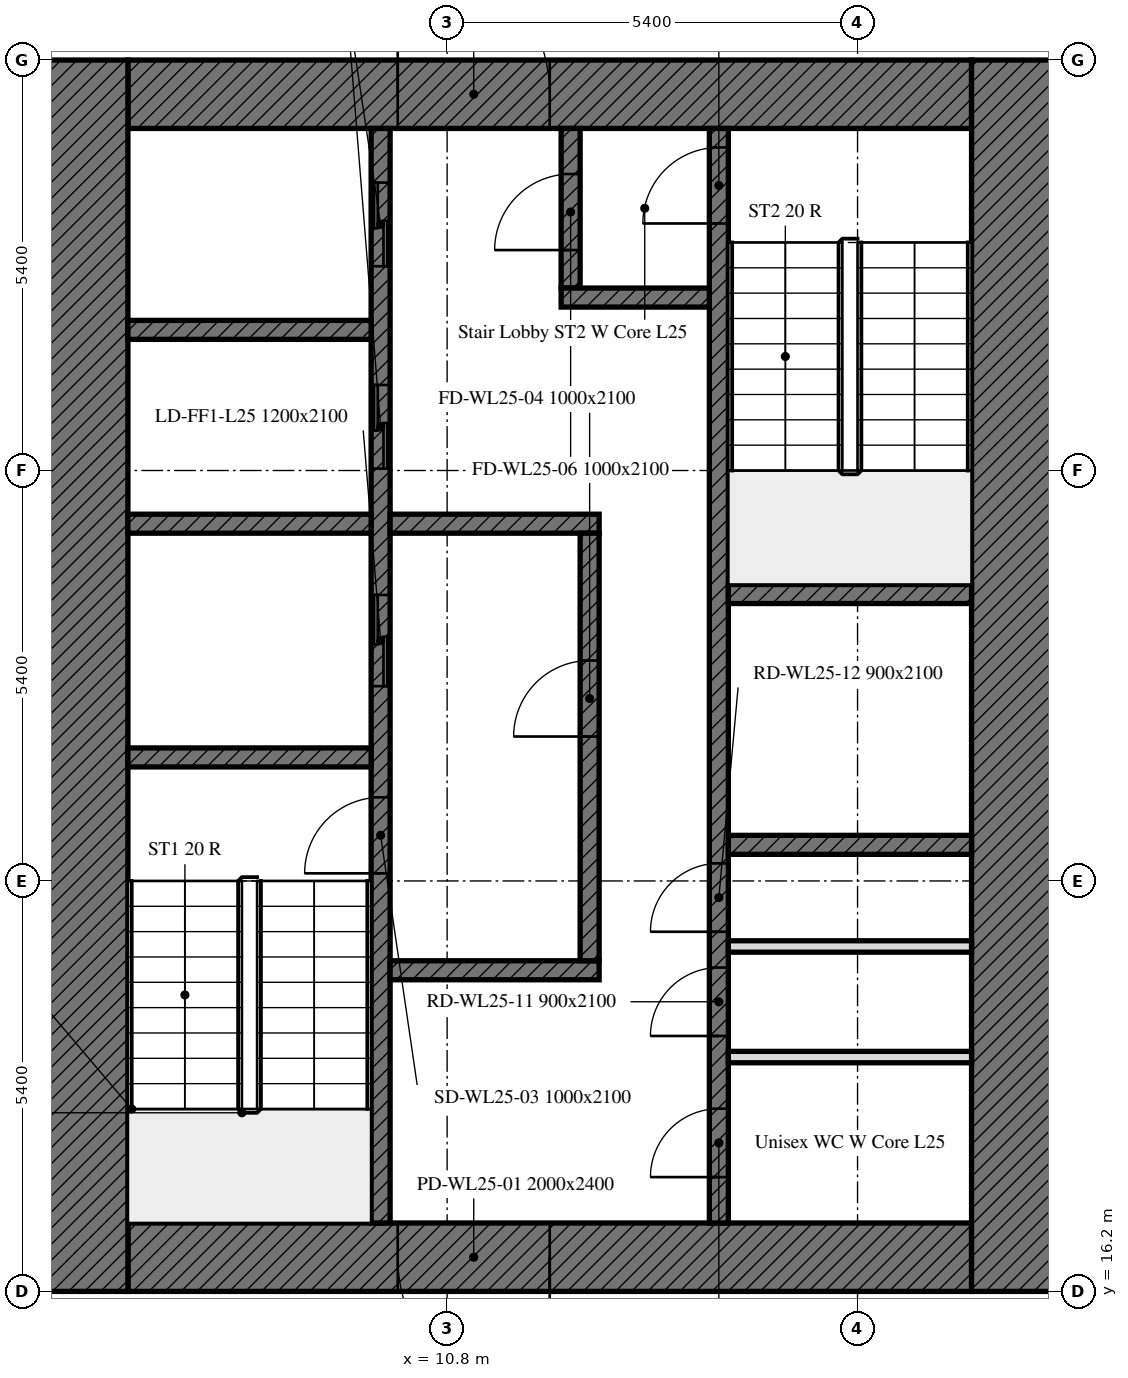
"""IFC4 building model, lengths in metres.
Left out: names, types, materials, properties, quantities, classifications, styles, units other than length and angle.
Written with IfcOpenShell. Run it as: python <this file> out.ifc"""

import sys

from ifc_helpers import new_model, si_unit, direction, frame, frame_2d, origin, place, context, subcontext, project, spatial, rectangle, extrude, element, fill, save


model = new_model("IFC4")
c1 = context("Model", 3, precision=1e-05, world=origin(), true_north=direction((0.0, 1.0)))
c2 = subcontext(c1, "Body", "Model", "MODEL_VIEW")
j1 = project(units=[si_unit("LENGTHUNIT", "METRE"), si_unit("PLANEANGLEUNIT", "RADIAN")], contexts=[c1])
p1 = place(None, origin())
s1 = spatial("IfcSite", under=j1, at=p1, CompositionType="ELEMENT")
p2 = place(p1, origin())
s2 = spatial("IfcBuilding", under=s1, at=p2, CompositionType="ELEMENT")
p3 = place(p2, frame((0.0, 0.0, 106.8)))
s3 = spatial("IfcBuildingStorey", under=s2, at=p3, CompositionType="ELEMENT", Elevation=106.8)
p4 = place(p3, frame((17.7, 16.65, 0.0), z_axis=(0.0, 0.0, 1.0), x_axis=(-1.0, 0.0, 0.0)))
e1 = element("IfcWall", 1, at=p4, inside=s3, PredefinedType="SOLIDWALL", context=c2, shape_type="SweptSolid", body=[
    extrude(rectangle(XDim=11.1, YDim=0.9, at=frame_2d((5.55, 0.0))), origin(), (0.0, 0.0, 1.0), 3.5),
])
p5 = place(p4, frame((5.55, 0.0, 0.0)))
e2 = element("IfcOpeningElement", 2, at=p5, cuts=e1, PredefinedType="OPENING", context=c2, shape_type="SweptSolid", body=[
    extrude(rectangle(XDim=2.0, YDim=2.4, at=frame_2d((1.0, 1.2))), frame((0.0, 0.45, 0.0), z_axis=(0.0, -1.0, 0.0), x_axis=(1.0, 0.0, 0.0)), (0.0, 0.0, 1.0), 0.9),
])
p6 = place(p3, frame((6.6, 31.95, 0.0), z_axis=(0.0, 0.0, 1.0), x_axis=(1.0, 0.0, 0.0)))
e3 = element("IfcWall", 3, at=p6, inside=s3, PredefinedType="SOLIDWALL", context=c2, shape_type="SweptSolid", body=[
    extrude(rectangle(XDim=11.1, YDim=0.9, at=frame_2d((5.55, 0.0))), origin(), (0.0, 0.0, 1.0), 3.5),
])
p7 = place(p6, frame((3.55, 0.0, 0.0)))
e4 = element("IfcOpeningElement", 4, at=p7, cuts=e3, PredefinedType="OPENING", context=c2, shape_type="SweptSolid", body=[
    extrude(rectangle(XDim=2.0, YDim=2.4, at=frame_2d((1.0, 1.2))), frame((0.0, 0.45, 0.0), z_axis=(0.0, -1.0, 0.0), x_axis=(1.0, 0.0, 0.0)), (0.0, 0.0, 1.0), 0.9),
])
for number, where, z_axis, x_axis in (
    (5, (6.0, 16.2, 0.0), (0.0, 0.0, 1.0), (0.0, 1.0, 0.0)),
    (6, (18.3, 32.4, 0.0), (0.0, 0.0, 1.0), (0.0, -1.0, 0.0)),
):
    element("IfcWall", number, at=place(p3, frame(where, z_axis=z_axis, x_axis=x_axis)), inside=s3, PredefinedType="SOLIDWALL", context=c2, shape_type="SweptSolid", body=[
        extrude(rectangle(XDim=16.2, YDim=1.2, at=frame_2d((8.1, 0.0))), origin(), (0.0, 0.0, 1.0), 3.5),
    ])
p8 = place(p3, frame((9.925, 17.1, 0.0), z_axis=(0.0, 0.0, 1.0), x_axis=(0.0, 1.0, 0.0)))
e7 = element("IfcWall", 7, at=p8, inside=s3, PredefinedType="SOLIDWALL", context=c2, shape_type="SweptSolid", body=[
    extrude(rectangle(XDim=14.4, YDim=0.25, at=frame_2d((7.2, 0.0))), origin(), (0.0, 0.0, 1.0), 3.5),
])
p9 = place(p8, frame((4.6, 0.0, 0.0)))
e8 = element("IfcOpeningElement", 8, at=p9, cuts=e7, PredefinedType="OPENING", context=c2, shape_type="SweptSolid", body=[
    extrude(rectangle(XDim=1.0, YDim=2.1, at=frame_2d((0.5, 1.05))), frame((0.0, 0.125, 0.0), z_axis=(0.0, -1.0, 0.0), x_axis=(1.0, 0.0, 0.0)), (0.0, 0.0, 1.0), 0.25),
])
p10 = place(p8, frame((7.062, 0.0, 0.0)))
e9 = element("IfcOpeningElement", 9, at=p10, cuts=e7, PredefinedType="OPENING", context=c2, shape_type="SweptSolid", body=[
    extrude(rectangle(XDim=1.2, YDim=2.1, at=frame_2d((0.6, 1.05))), frame((0.0, 0.125, 0.0), z_axis=(0.0, -1.0, 0.0), x_axis=(1.0, 0.0, 0.0)), (0.0, 0.0, 1.0), 0.25),
])
p11 = place(p8, frame((9.925, 0.0, 0.0)))
e10 = element("IfcOpeningElement", 10, at=p11, cuts=e7, PredefinedType="OPENING", context=c2, shape_type="SweptSolid", body=[
    extrude(rectangle(XDim=1.1, YDim=2.1, at=frame_2d((0.55, 1.05))), frame((0.0, 0.125, 0.0), z_axis=(0.0, -1.0, 0.0), x_axis=(1.0, 0.0, 0.0)), (0.0, 0.0, 1.0), 0.25),
])
p12 = place(p8, frame((12.587, 0.0, 0.0)))
e11 = element("IfcOpeningElement", 11, at=p12, cuts=e7, PredefinedType="OPENING", context=c2, shape_type="SweptSolid", body=[
    extrude(rectangle(XDim=1.1, YDim=2.1, at=frame_2d((0.55, 1.05))), frame((0.0, 0.125, 0.0), z_axis=(0.0, -1.0, 0.0), x_axis=(1.0, 0.0, 0.0)), (0.0, 0.0, 1.0), 0.25),
])
p13 = place(p3, frame((14.375, 17.1, 0.0), z_axis=(0.0, 0.0, 1.0), x_axis=(0.0, 1.0, 0.0)))
e12 = element("IfcWall", 12, at=p13, inside=s3, PredefinedType="SOLIDWALL", context=c2, shape_type="SweptSolid", body=[
    extrude(rectangle(XDim=14.4, YDim=0.25, at=frame_2d((7.2, 0.0))), origin(), (0.0, 0.0, 1.0), 3.5),
])
p14 = place(p13, frame((13.15, 0.0, 0.0)))
e13 = element("IfcOpeningElement", 13, at=p14, cuts=e12, PredefinedType="OPENING", context=c2, shape_type="SweptSolid", body=[
    extrude(rectangle(XDim=1.0, YDim=2.1, at=frame_2d((0.5, 1.05))), frame((0.0, 0.125, 0.0), z_axis=(0.0, -1.0, 0.0), x_axis=(1.0, 0.0, 0.0)), (0.0, 0.0, 1.0), 0.25),
])
p15 = place(p13, frame((0.604, 0.0, 0.0)))
e14 = element("IfcOpeningElement", 14, at=p15, cuts=e12, PredefinedType="OPENING", context=c2, shape_type="SweptSolid", body=[
    extrude(rectangle(XDim=0.9, YDim=2.1, at=frame_2d((0.45, 1.05))), frame((0.0, 0.125, 0.0), z_axis=(0.0, -1.0, 0.0), x_axis=(1.0, 0.0, 0.0)), (0.0, 0.0, 1.0), 0.25),
])
p16 = place(p13, frame((2.46, 0.0, 0.0)))
e15 = element("IfcOpeningElement", 15, at=p16, cuts=e12, PredefinedType="OPENING", context=c2, shape_type="SweptSolid", body=[
    extrude(rectangle(XDim=0.9, YDim=2.1, at=frame_2d((0.45, 1.05))), frame((0.0, 0.125, 0.0), z_axis=(0.0, -1.0, 0.0), x_axis=(1.0, 0.0, 0.0)), (0.0, 0.0, 1.0), 0.25),
])
p17 = place(p13, frame((3.832, 0.0, 0.0)))
e16 = element("IfcOpeningElement", 16, at=p17, cuts=e12, PredefinedType="OPENING", context=c2, shape_type="SweptSolid", body=[
    extrude(rectangle(XDim=0.9, YDim=2.1, at=frame_2d((0.45, 1.05))), frame((0.0, 0.125, 0.0), z_axis=(0.0, -1.0, 0.0), x_axis=(1.0, 0.0, 0.0)), (0.0, 0.0, 1.0), 0.25),
])
for number, where, z_axis, x_axis in (
    (17, (6.6, 23.225, 0.0), (0.0, 0.0, 1.0), (1.0, 0.0, 0.0)),
    (18, (14.5, 25.375, 0.0), (0.0, 0.0, 1.0), (1.0, 0.0, 0.0)),
    (19, (14.5, 22.075, 0.0), (0.0, 0.0, 1.0), (1.0, 0.0, 0.0)),
    (20, (6.6, 26.3, 0.0), (0.0, 0.0, 1.0), (1.0, 0.0, 0.0)),
):
    element("IfcWall", number, at=place(p3, frame(where, z_axis=z_axis, x_axis=x_axis)), inside=s3, PredefinedType="SOLIDWALL", context=c2, shape_type="SweptSolid", body=[
        extrude(rectangle(XDim=3.2, YDim=0.25, at=frame_2d((1.6, 0.0))), origin(), (0.0, 0.0, 1.0), 3.5),
    ])
for number, where, z_axis, x_axis in (
    (21, (10.05, 26.3, 0.0), (0.0, 0.0, 1.0), (1.0, 0.0, 0.0)),
    (22, (10.05, 20.425, 0.0), (0.0, 0.0, 1.0), (1.0, 0.0, 0.0)),
):
    element("IfcWall", number, at=place(p3, frame(where, z_axis=z_axis, x_axis=x_axis)), inside=s3, PredefinedType="SOLIDWALL", context=c2, shape_type="SweptSolid", body=[
        extrude(rectangle(XDim=2.75, YDim=0.25, at=frame_2d((1.375, 0.0))), origin(), (0.0, 0.0, 1.0), 3.5),
    ])
p18 = place(p3, frame((12.425, 29.4, 0.0), z_axis=(0.0, 0.0, 1.0), x_axis=(0.0, 1.0, 0.0)))
e23 = element("IfcWall", 23, at=p18, inside=s3, PredefinedType="SOLIDWALL", context=c2, shape_type="SweptSolid", body=[
    extrude(rectangle(XDim=2.1, YDim=0.25, at=frame_2d((1.05, 0.0))), origin(), (0.0, 0.0, 1.0), 3.5),
])
p19 = place(p18, frame((0.5, 0.0, 0.0)))
e24 = element("IfcOpeningElement", 24, at=p19, cuts=e23, PredefinedType="OPENING", context=c2, shape_type="SweptSolid", body=[
    extrude(rectangle(XDim=1.0, YDim=2.1, at=frame_2d((0.5, 1.05))), frame((0.0, 0.125, 0.0), z_axis=(0.0, -1.0, 0.0), x_axis=(1.0, 0.0, 0.0)), (0.0, 0.0, 1.0), 0.25),
])
p20 = place(p3, frame((12.3, 29.275, 0.0), z_axis=(0.0, 0.0, 1.0), x_axis=(1.0, 0.0, 0.0)))
e25 = element("IfcWall", 25, at=p20, inside=s3, PredefinedType="SOLIDWALL", context=c2, shape_type="SweptSolid", body=[
    extrude(rectangle(XDim=1.95, YDim=0.25, at=frame_2d((0.975, 0.0))), origin(), (0.0, 0.0, 1.0), 3.5),
])
p21 = place(p3, frame((12.675, 20.55, 0.0), z_axis=(0.0, 0.0, 1.0), x_axis=(0.0, 1.0, 0.0)))
e26 = element("IfcWall", 26, at=p21, inside=s3, PredefinedType="SOLIDWALL", context=c2, shape_type="SweptSolid", body=[
    extrude(rectangle(XDim=5.625, YDim=0.25, at=frame_2d((2.812, 0.0))), origin(), (0.0, 0.0, 1.0), 3.5),
])
p22 = place(p21, frame((2.95, 0.0, 0.0)))
e27 = element("IfcOpeningElement", 27, at=p22, cuts=e26, PredefinedType="OPENING", context=c2, shape_type="SweptSolid", body=[
    extrude(rectangle(XDim=1.0, YDim=2.1, at=frame_2d((0.5, 1.05))), frame((0.0, 0.125, 0.0), z_axis=(0.0, -1.0, 0.0), x_axis=(1.0, 0.0, 0.0)), (0.0, 0.0, 1.0), 0.25),
])
p23 = place(p3, frame((6.6, 28.85, 0.0), z_axis=(0.0, 0.0, 1.0), x_axis=(1.0, 0.0, 0.0)))
e28 = element("IfcWall", 28, at=p23, inside=s3, PredefinedType="SOLIDWALL", context=c2, shape_type="SweptSolid", body=[
    extrude(rectangle(XDim=3.2, YDim=0.25, at=frame_2d((1.6, 0.0))), origin(), (0.0, 0.0, 1.0), 3.5),
])
for number, where, z_axis, x_axis in (
    (29, (14.5, 19.283, 0.0), (0.0, 0.0, 1.0), (1.0, 0.0, 0.0)),
    (30, (14.5, 20.738, 0.0), (0.0, 0.0, 1.0), (1.0, 0.0, 0.0)),
):
    element("IfcWall", number, at=place(p3, frame(where, z_axis=z_axis, x_axis=x_axis)), inside=s3, PredefinedType="PARTITIONING", context=c2, shape_type="SweptSolid", body=[
        extrude(rectangle(XDim=3.2, YDim=0.15, at=frame_2d((1.6, 0.0))), origin(), (0.0, 0.0, 1.0), 3.5),
    ])
p24 = place(p5, origin())
e31 = element("IfcDoor", 31, at=p24, inside=s3, OperationType="DOUBLE_DOOR_SINGLE_SWING", PredefinedType="DOOR", context=c2, shape_type="SweptSolid", body=[
    extrude(rectangle(XDim=2.0, YDim=2.4, at=frame_2d((1.0, 1.2))), frame((0.0, 0.025, 0.0), z_axis=(0.0, -1.0, 0.0), x_axis=(1.0, 0.0, 0.0)), (0.0, 0.0, 1.0), 0.05),
])
fill(e2, e31)
p25 = place(p7, origin())
e32 = element("IfcDoor", 32, at=p25, inside=s3, OperationType="DOUBLE_DOOR_SINGLE_SWING", PredefinedType="DOOR", context=c2, shape_type="SweptSolid", body=[
    extrude(rectangle(XDim=2.0, YDim=2.4, at=frame_2d((1.0, 1.2))), frame((0.0, 0.025, 0.0), z_axis=(0.0, -1.0, 0.0), x_axis=(1.0, 0.0, 0.0)), (0.0, 0.0, 1.0), 0.05),
])
fill(e4, e32)
p26 = place(p9, origin())
e33 = element("IfcDoor", 33, at=p26, inside=s3, OperationType="SINGLE_SWING_LEFT", PredefinedType="DOOR", context=c2, shape_type="SweptSolid", body=[
    extrude(rectangle(XDim=1.0, YDim=2.1, at=frame_2d((0.5, 1.05))), frame((0.0, 0.025, 0.0), z_axis=(0.0, -1.0, 0.0), x_axis=(1.0, 0.0, 0.0)), (0.0, 0.0, 1.0), 0.05),
])
fill(e8, e33)
p27 = place(p22, origin())
e34 = element("IfcDoor", 34, at=p27, inside=s3, OperationType="SINGLE_SWING_LEFT", PredefinedType="DOOR", context=c2, shape_type="SweptSolid", body=[
    extrude(rectangle(XDim=1.0, YDim=2.1, at=frame_2d((0.5, 1.05))), frame((0.0, 0.025, 0.0), z_axis=(0.0, -1.0, 0.0), x_axis=(1.0, 0.0, 0.0)), (0.0, 0.0, 1.0), 0.05),
])
fill(e27, e34)
p28 = place(p14, origin())
e35 = element("IfcDoor", 35, at=p28, inside=s3, OperationType="SINGLE_SWING_LEFT", PredefinedType="DOOR", context=c2, shape_type="SweptSolid", body=[
    extrude(rectangle(XDim=1.0, YDim=2.1, at=frame_2d((0.5, 1.05))), frame((0.0, 0.025, 0.0), z_axis=(0.0, -1.0, 0.0), x_axis=(1.0, 0.0, 0.0)), (0.0, 0.0, 1.0), 0.05),
])
fill(e13, e35)
p29 = place(p19, origin())
e36 = element("IfcDoor", 36, at=p29, inside=s3, OperationType="SINGLE_SWING_LEFT", PredefinedType="DOOR", context=c2, shape_type="SweptSolid", body=[
    extrude(rectangle(XDim=1.0, YDim=2.1, at=frame_2d((0.5, 1.05))), frame((0.0, 0.025, 0.0), z_axis=(0.0, -1.0, 0.0), x_axis=(1.0, 0.0, 0.0)), (0.0, 0.0, 1.0), 0.05),
])
fill(e24, e36)
p30 = place(p10, origin())
e37 = element("IfcDoor", 37, at=p30, inside=s3, OperationType="DOUBLE_DOOR_SLIDING", PredefinedType="DOOR", context=c2, shape_type="SweptSolid", body=[
    extrude(rectangle(XDim=1.2, YDim=2.1, at=frame_2d((0.6, 1.05))), frame((0.0, 0.025, 0.0), z_axis=(0.0, -1.0, 0.0), x_axis=(1.0, 0.0, 0.0)), (0.0, 0.0, 1.0), 0.05),
])
fill(e9, e37)
p31 = place(p11, origin())
e38 = element("IfcDoor", 38, at=p31, inside=s3, OperationType="DOUBLE_DOOR_SLIDING", PredefinedType="DOOR", context=c2, shape_type="SweptSolid", body=[
    extrude(rectangle(XDim=1.1, YDim=2.1, at=frame_2d((0.55, 1.05))), frame((0.0, 0.025, 0.0), z_axis=(0.0, -1.0, 0.0), x_axis=(1.0, 0.0, 0.0)), (0.0, 0.0, 1.0), 0.05),
])
fill(e10, e38)
p32 = place(p12, origin())
e39 = element("IfcDoor", 39, at=p32, inside=s3, OperationType="DOUBLE_DOOR_SLIDING", PredefinedType="DOOR", context=c2, shape_type="SweptSolid", body=[
    extrude(rectangle(XDim=1.1, YDim=2.1, at=frame_2d((0.55, 1.05))), frame((0.0, 0.025, 0.0), z_axis=(0.0, -1.0, 0.0), x_axis=(1.0, 0.0, 0.0)), (0.0, 0.0, 1.0), 0.05),
])
fill(e11, e39)
p33 = place(p15, origin())
e40 = element("IfcDoor", 40, at=p33, inside=s3, OperationType="SINGLE_SWING_LEFT", PredefinedType="DOOR", context=c2, shape_type="SweptSolid", body=[
    extrude(rectangle(XDim=0.9, YDim=2.1, at=frame_2d((0.45, 1.05))), frame((0.0, 0.025, 0.0), z_axis=(0.0, -1.0, 0.0), x_axis=(1.0, 0.0, 0.0)), (0.0, 0.0, 1.0), 0.05),
])
fill(e14, e40)
p34 = place(p16, origin())
e41 = element("IfcDoor", 41, at=p34, inside=s3, OperationType="SINGLE_SWING_LEFT", PredefinedType="DOOR", context=c2, shape_type="SweptSolid", body=[
    extrude(rectangle(XDim=0.9, YDim=2.1, at=frame_2d((0.45, 1.05))), frame((0.0, 0.025, 0.0), z_axis=(0.0, -1.0, 0.0), x_axis=(1.0, 0.0, 0.0)), (0.0, 0.0, 1.0), 0.05),
])
fill(e15, e41)
p35 = place(p17, origin())
e42 = element("IfcDoor", 42, at=p35, inside=s3, OperationType="SINGLE_SWING_LEFT", PredefinedType="DOOR", context=c2, shape_type="SweptSolid", body=[
    extrude(rectangle(XDim=0.9, YDim=2.1, at=frame_2d((0.45, 1.05))), frame((0.0, 0.025, 0.0), z_axis=(0.0, -1.0, 0.0), x_axis=(1.0, 0.0, 0.0)), (0.0, 0.0, 1.0), 0.05),
])
fill(e16, e42)
save(model, sys.argv[1])
